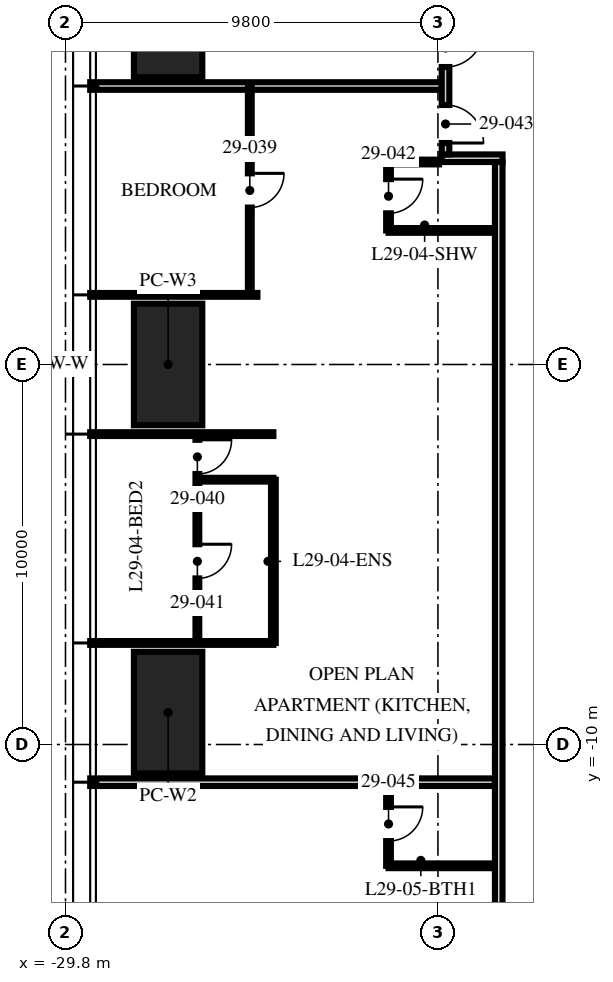
"""IFC4 building model, lengths in metres.
Left out: names, types, materials, properties, quantities, classifications, styles, units other than length and angle.
Written with IfcOpenShell. Run it as: python <this file> out.ifc"""

import sys

from ifc_helpers import new_model, si_unit, direction, frame, frame_2d, origin, origin_2d, place, context, subcontext, project, spatial, rectangle, hollow_rectangle, extrude, element, fill, save


model = new_model("IFC4")
c1 = context("Model", 3, precision=1e-05, world=origin(), true_north=direction((0.0, 1.0)))
c2 = subcontext(c1, "Body", "Model", "MODEL_VIEW")
j1 = project(units=[si_unit("LENGTHUNIT", "METRE"), si_unit("PLANEANGLEUNIT", "RADIAN")], contexts=[c1])
p1 = place(None, origin())
s1 = spatial("IfcSite", under=j1, at=p1, CompositionType="ELEMENT")
p2 = place(p1, origin())
s2 = spatial("IfcBuilding", under=s1, at=p2, CompositionType="ELEMENT")
p3 = place(p2, frame((0.0, 0.0, 118.5)))
s3 = spatial("IfcBuildingStorey", under=s2, at=p3, CompositionType="ELEMENT", Elevation=118.5)
for number, where, z_axis, x_axis in (
    (1, (-27.1, -9.16, 0.0), (0.0, 0.0, 1.0), (0.0, 1.0, 0.0)),
    (2, (-27.1, 0.0, 0.0), (0.0, 0.0, 1.0), (0.0, 1.0, 0.0)),
    (3, (-27.1, 9.16, 0.0), (0.0, 0.0, 1.0), (0.0, 1.0, 0.0)),
):
    element("IfcColumn", number, at=place(p3, frame(where, z_axis=z_axis, x_axis=x_axis)), inside=s3, PredefinedType="COLUMN", context=c2, shape_type="SweptSolid", body=[
        extrude(hollow_rectangle(XDim=3.2, YDim=1.8, WallThickness=0.2, at=origin_2d()), origin(), (0.0, 0.0, 1.0), 3.75),
    ])
p4 = place(p3, frame((-19.9, 7.328, 0.0), z_axis=(0.0, 0.0, 1.0), x_axis=(-1.0, 0.0, 0.0)))
e4 = element("IfcWall", 4, at=p4, inside=s3, PredefinedType="PARTITIONING", context=c2, shape_type="SweptSolid", body=[
    extrude(rectangle(XDim=9.25, YDim=0.2, at=frame_2d((4.625, 0.0))), origin(), (0.0, 0.0, 1.0), 2.81),
])
p5 = place(p3, frame((-24.75, 1.832, 0.0), z_axis=(0.0, 0.0, 1.0), x_axis=(-1.0, 0.0, 0.0)))
e5 = element("IfcWall", 5, at=p5, inside=s3, PredefinedType="PARTITIONING", context=c2, shape_type="SweptSolid", body=[
    extrude(rectangle(XDim=4.4, YDim=0.1, at=frame_2d((2.2, 0.0))), origin(), (0.0, 0.0, 1.0), 2.81),
])
for number, where, z_axis, x_axis in (
    (6, (-24.33, -1.832, 0.0), (0.0, 0.0, 1.0), (-1.0, 0.0, 0.0)),
    (7, (-24.33, -7.328, 0.0), (0.0, 0.0, 1.0), (-1.0, 0.0, 0.0)),
):
    element("IfcWall", number, at=place(p3, frame(where, z_axis=z_axis, x_axis=x_axis)), inside=s3, PredefinedType="PARTITIONING", context=c2, shape_type="SweptSolid", body=[
        extrude(rectangle(XDim=4.82, YDim=0.1, at=frame_2d((2.41, 0.0))), origin(), (0.0, 0.0, 1.0), 2.81),
    ])
p6 = place(p3, frame((-18.5, -10.992, 0.0), z_axis=(0.0, 0.0, 1.0), x_axis=(-1.0, 0.0, 0.0)))
e8 = element("IfcWall", 8, at=p6, inside=s3, PredefinedType="PARTITIONING", context=c2, shape_type="SweptSolid", body=[
    extrude(rectangle(XDim=10.65, YDim=0.2, at=frame_2d((5.325, 0.0))), origin(), (0.0, 0.0, 1.0), 2.81),
])
p7 = place(p3, frame((-24.95, 7.328, 0.0), z_axis=(0.0, 0.0, 1.0), x_axis=(0.0, -1.0, 0.0)))
e9 = element("IfcWall", 9, at=p7, inside=s3, PredefinedType="PARTITIONING", context=c2, shape_type="SweptSolid", body=[
    extrude(rectangle(XDim=5.496, YDim=0.1, at=frame_2d((2.748, 0.0))), origin(), (0.0, 0.0, 1.0), 2.81),
])
p8 = place(p7, frame((2.298, 0.0, 0.0)))
e10 = element("IfcOpeningElement", 10, at=p8, cuts=e9, PredefinedType="OPENING", context=c2, shape_type="SweptSolid", body=[
    extrude(rectangle(XDim=0.9, YDim=2.1, at=frame_2d((0.45, 1.05))), frame((0.0, 0.06, 0.0), z_axis=(0.0, -1.0, 0.0), x_axis=(1.0, 0.0, 0.0)), (0.0, 0.0, 1.0), 0.12),
])
p9 = place(p3, frame((-26.33, -1.832, 0.0), z_axis=(0.0, 0.0, 1.0), x_axis=(0.0, -1.0, 0.0)))
e11 = element("IfcWall", 11, at=p9, inside=s3, PredefinedType="PARTITIONING", context=c2, shape_type="SweptSolid", body=[
    extrude(rectangle(XDim=5.496, YDim=0.1, at=frame_2d((2.748, 0.0))), origin(), (0.0, 0.0, 1.0), 2.81),
])
p10 = place(p9, frame((0.15, 0.0, 0.0)))
e12 = element("IfcOpeningElement", 12, at=p10, cuts=e11, PredefinedType="OPENING", context=c2, shape_type="SweptSolid", body=[
    extrude(rectangle(XDim=0.9, YDim=2.1, at=frame_2d((0.45, 1.05))), frame((0.0, 0.06, 0.0), z_axis=(0.0, -1.0, 0.0), x_axis=(1.0, 0.0, 0.0)), (0.0, 0.0, 1.0), 0.12),
])
p11 = place(p9, frame((2.898, 0.0, 0.0)))
e13 = element("IfcOpeningElement", 13, at=p11, cuts=e11, PredefinedType="OPENING", context=c2, shape_type="SweptSolid", body=[
    extrude(rectangle(XDim=0.9, YDim=2.1, at=frame_2d((0.45, 1.05))), frame((0.0, 0.06, 0.0), z_axis=(0.0, -1.0, 0.0), x_axis=(1.0, 0.0, 0.0)), (0.0, 0.0, 1.0), 0.12),
])
p12 = place(p3, frame((-24.33, -3.032, 0.0), z_axis=(0.0, 0.0, 1.0), x_axis=(-1.0, 0.0, 0.0)))
e14 = element("IfcWall", 14, at=p12, inside=s3, PredefinedType="PARTITIONING", context=c2, shape_type="SweptSolid", body=[
    extrude(rectangle(XDim=2.0, YDim=0.1, at=frame_2d((1.0, 0.0))), origin(), (0.0, 0.0, 1.0), 3.5),
])
p13 = place(p3, frame((-24.33, -3.032, 0.0), z_axis=(0.0, 0.0, 1.0), x_axis=(0.0, -1.0, 0.0)))
e15 = element("IfcWall", 15, at=p13, inside=s3, PredefinedType="PARTITIONING", context=c2, shape_type="SweptSolid", body=[
    extrude(rectangle(XDim=4.296, YDim=0.125, at=frame_2d((2.148, 0.0))), origin(), (0.0, 0.0, 1.0), 2.81),
])
p14 = place(p3, frame((-21.3, 5.328, 0.0), z_axis=(0.0, 0.0, 1.0), x_axis=(0.0, -1.0, 0.0)))
e16 = element("IfcWall", 16, at=p14, inside=s3, PredefinedType="PARTITIONING", context=c2, shape_type="SweptSolid", body=[
    extrude(rectangle(XDim=1.8, YDim=0.125, at=frame_2d((0.9, 0.0))), origin(), (0.0, 0.0, 1.0), 2.81),
])
p15 = place(p14, frame((0.45, 0.0, 0.0)))
e17 = element("IfcOpeningElement", 17, at=p15, cuts=e16, PredefinedType="OPENING", context=c2, shape_type="SweptSolid", body=[
    extrude(rectangle(XDim=0.9, YDim=2.1, at=frame_2d((0.45, 1.05))), frame((0.0, 0.073, 0.0), z_axis=(0.0, -1.0, 0.0), x_axis=(1.0, 0.0, 0.0)), (0.0, 0.0, 1.0), 0.145),
])
p16 = place(p3, frame((-19.97, 5.328, 0.0), z_axis=(0.0, 0.0, 1.0), x_axis=(-1.0, 0.0, 0.0)))
e18 = element("IfcWall", 18, at=p16, inside=s3, PredefinedType="PARTITIONING", context=c2, shape_type="SweptSolid", body=[
    extrude(rectangle(XDim=1.33, YDim=0.125, at=frame_2d((0.665, 0.0))), origin(), (0.0, 0.0, 1.0), 3.5),
])
p17 = place(p3, frame((-18.5, 3.528, 0.0), z_axis=(0.0, 0.0, 1.0), x_axis=(-1.0, 0.0, 0.0)))
e19 = element("IfcWall", 19, at=p17, inside=s3, PredefinedType="PARTITIONING", context=c2, shape_type="SweptSolid", body=[
    extrude(rectangle(XDim=2.8, YDim=0.125, at=frame_2d((1.4, 0.0))), origin(), (0.0, 0.0, 1.0), 3.5),
])
p18 = place(p3, frame((-21.3, -10.992, 0.0), z_axis=(0.0, 0.0, 1.0), x_axis=(0.0, -1.0, 0.0)))
e20 = element("IfcWall", 20, at=p18, inside=s3, PredefinedType="PARTITIONING", context=c2, shape_type="SweptSolid", body=[
    extrude(rectangle(XDim=2.2, YDim=0.125, at=frame_2d((1.1, 0.0))), origin(), (0.0, 0.0, 1.0), 3.5),
])
p19 = place(p18, frame((0.65, 0.0, 0.0)))
e21 = element("IfcOpeningElement", 21, at=p19, cuts=e20, PredefinedType="OPENING", context=c2, shape_type="SweptSolid", body=[
    extrude(rectangle(XDim=0.9, YDim=2.1, at=frame_2d((0.45, 1.05))), frame((0.0, 0.073, 0.0), z_axis=(0.0, -1.0, 0.0), x_axis=(1.0, 0.0, 0.0)), (0.0, 0.0, 1.0), 0.145),
])
p20 = place(p3, frame((-18.5, -13.192, 0.0), z_axis=(0.0, 0.0, 1.0), x_axis=(-1.0, 0.0, 0.0)))
e22 = element("IfcWall", 22, at=p20, inside=s3, PredefinedType="PARTITIONING", context=c2, shape_type="SweptSolid", body=[
    extrude(rectangle(XDim=2.8, YDim=0.125, at=frame_2d((1.4, 0.0))), origin(), (0.0, 0.0, 1.0), 3.5),
])
p21 = place(p3, frame((-18.3, 5.428, 0.0), z_axis=(0.0, 0.0, 1.0), x_axis=(-1.0, 0.0, 0.0)))
e23 = element("IfcWall", 23, at=p21, inside=s3, PredefinedType="PARTITIONING", context=c2, shape_type="SweptSolid", body=[
    extrude(rectangle(XDim=1.6, YDim=0.2, at=frame_2d((0.8, 0.0))), origin(), (0.0, 0.0, 1.0), 3.5),
])
p22 = place(p3, frame((-19.8, 9.128, 0.0), z_axis=(0.0, 0.0, 1.0), x_axis=(0.0, -1.0, 0.0)))
e24 = element("IfcWall", 24, at=p22, inside=s3, PredefinedType="PARTITIONING", context=c2, shape_type="SweptSolid", body=[
    extrude(rectangle(XDim=3.6, YDim=0.2, at=frame_2d((1.8, 0.0))), origin(), (0.0, 0.0, 1.0), 2.7),
])
p23 = place(p22, frame((0.3, 0.0, 0.0)))
e25 = element("IfcOpeningElement", 25, at=p23, cuts=e24, PredefinedType="OPENING", context=c2, shape_type="SweptSolid", body=[
    extrude(rectangle(XDim=1.0, YDim=2.2, at=frame_2d((0.5, 1.1))), frame((0.0, 0.11, 0.0), z_axis=(0.0, -1.0, 0.0), x_axis=(1.0, 0.0, 0.0)), (0.0, 0.0, 1.0), 0.22),
])
p24 = place(p22, frame((2.3, 0.0, 0.0)))
e26 = element("IfcOpeningElement", 26, at=p24, cuts=e24, PredefinedType="OPENING", context=c2, shape_type="SweptSolid", body=[
    extrude(rectangle(XDim=1.0, YDim=2.2, at=frame_2d((0.5, 1.1))), frame((0.0, 0.11, 0.0), z_axis=(0.0, -1.0, 0.0), x_axis=(1.0, 0.0, 0.0)), (0.0, 0.0, 1.0), 0.22),
])
p25 = place(p3, frame((-18.4, 5.328, 0.0), z_axis=(0.0, 0.0, 1.0), x_axis=(0.0, -1.0, 0.0)))
e27 = element("IfcWall", 27, at=p25, inside=s3, PredefinedType="PARTITIONING", context=c2, shape_type="SweptSolid", body=[
    extrude(rectangle(XDim=23.628, YDim=0.2, at=frame_2d((11.814, 0.0))), origin(), (0.0, 0.0, 1.0), 2.3),
])
p26 = place(p25, frame((21.84, 0.0, 0.0)))
e28 = element("IfcOpeningElement", 28, at=p26, cuts=e27, PredefinedType="OPENING", context=c2, shape_type="SweptSolid", body=[
    extrude(rectangle(XDim=1.0, YDim=2.2, at=frame_2d((0.5, 1.1))), frame((0.0, 0.11, 0.0), z_axis=(0.0, -1.0, 0.0), x_axis=(1.0, 0.0, 0.0)), (0.0, 0.0, 1.0), 0.22),
])
p27 = place(p23, origin())
e29 = element("IfcDoor", 29, at=p27, inside=s3, OperationType="SINGLE_SWING_LEFT", PredefinedType="DOOR", context=c2, shape_type="SweptSolid", body=[
    extrude(rectangle(XDim=1.0, YDim=2.2, at=frame_2d((0.5, 1.1))), frame((0.0, 0.025, 0.0), z_axis=(0.0, -1.0, 0.0), x_axis=(1.0, 0.0, 0.0)), (0.0, 0.0, 1.0), 0.05),
])
fill(e25, e29)
p28 = place(p8, origin())
e30 = element("IfcDoor", 30, at=p28, inside=s3, OperationType="SINGLE_SWING_LEFT", PredefinedType="DOOR", context=c2, shape_type="SweptSolid", body=[
    extrude(rectangle(XDim=0.9, YDim=2.1, at=frame_2d((0.45, 1.05))), frame((0.0, 0.025, 0.0), z_axis=(0.0, -1.0, 0.0), x_axis=(1.0, 0.0, 0.0)), (0.0, 0.0, 1.0), 0.05),
])
fill(e10, e30)
p29 = place(p10, origin())
e31 = element("IfcDoor", 31, at=p29, inside=s3, OperationType="SINGLE_SWING_LEFT", PredefinedType="DOOR", context=c2, shape_type="SweptSolid", body=[
    extrude(rectangle(XDim=0.9, YDim=2.1, at=frame_2d((0.45, 1.05))), frame((0.0, 0.025, 0.0), z_axis=(0.0, -1.0, 0.0), x_axis=(1.0, 0.0, 0.0)), (0.0, 0.0, 1.0), 0.05),
])
fill(e12, e31)
p30 = place(p11, origin())
e32 = element("IfcDoor", 32, at=p30, inside=s3, OperationType="SINGLE_SWING_LEFT", PredefinedType="DOOR", context=c2, shape_type="SweptSolid", body=[
    extrude(rectangle(XDim=0.9, YDim=2.1, at=frame_2d((0.45, 1.05))), frame((0.0, 0.025, 0.0), z_axis=(0.0, -1.0, 0.0), x_axis=(1.0, 0.0, 0.0)), (0.0, 0.0, 1.0), 0.05),
])
fill(e13, e32)
p31 = place(p15, origin())
e33 = element("IfcDoor", 33, at=p31, inside=s3, OperationType="SINGLE_SWING_LEFT", PredefinedType="DOOR", context=c2, shape_type="SweptSolid", body=[
    extrude(rectangle(XDim=0.9, YDim=2.1, at=frame_2d((0.45, 1.05))), frame((0.0, 0.025, 0.0), z_axis=(0.0, -1.0, 0.0), x_axis=(1.0, 0.0, 0.0)), (0.0, 0.0, 1.0), 0.05),
])
fill(e17, e33)
p32 = place(p24, origin())
e34 = element("IfcDoor", 34, at=p32, inside=s3, OperationType="SINGLE_SWING_RIGHT", PredefinedType="DOOR", context=c2, shape_type="SweptSolid", body=[
    extrude(rectangle(XDim=1.0, YDim=2.2, at=frame_2d((0.5, 1.1))), frame((0.0, 0.025, 0.0), z_axis=(0.0, -1.0, 0.0), x_axis=(1.0, 0.0, 0.0)), (0.0, 0.0, 1.0), 0.05),
])
fill(e26, e34)
p33 = place(p19, origin())
e35 = element("IfcDoor", 35, at=p33, inside=s3, OperationType="SINGLE_SWING_LEFT", PredefinedType="DOOR", context=c2, shape_type="SweptSolid", body=[
    extrude(rectangle(XDim=0.9, YDim=2.1, at=frame_2d((0.45, 1.05))), frame((0.0, 0.025, 0.0), z_axis=(0.0, -1.0, 0.0), x_axis=(1.0, 0.0, 0.0)), (0.0, 0.0, 1.0), 0.05),
])
fill(e21, e35)
save(model, sys.argv[1])
